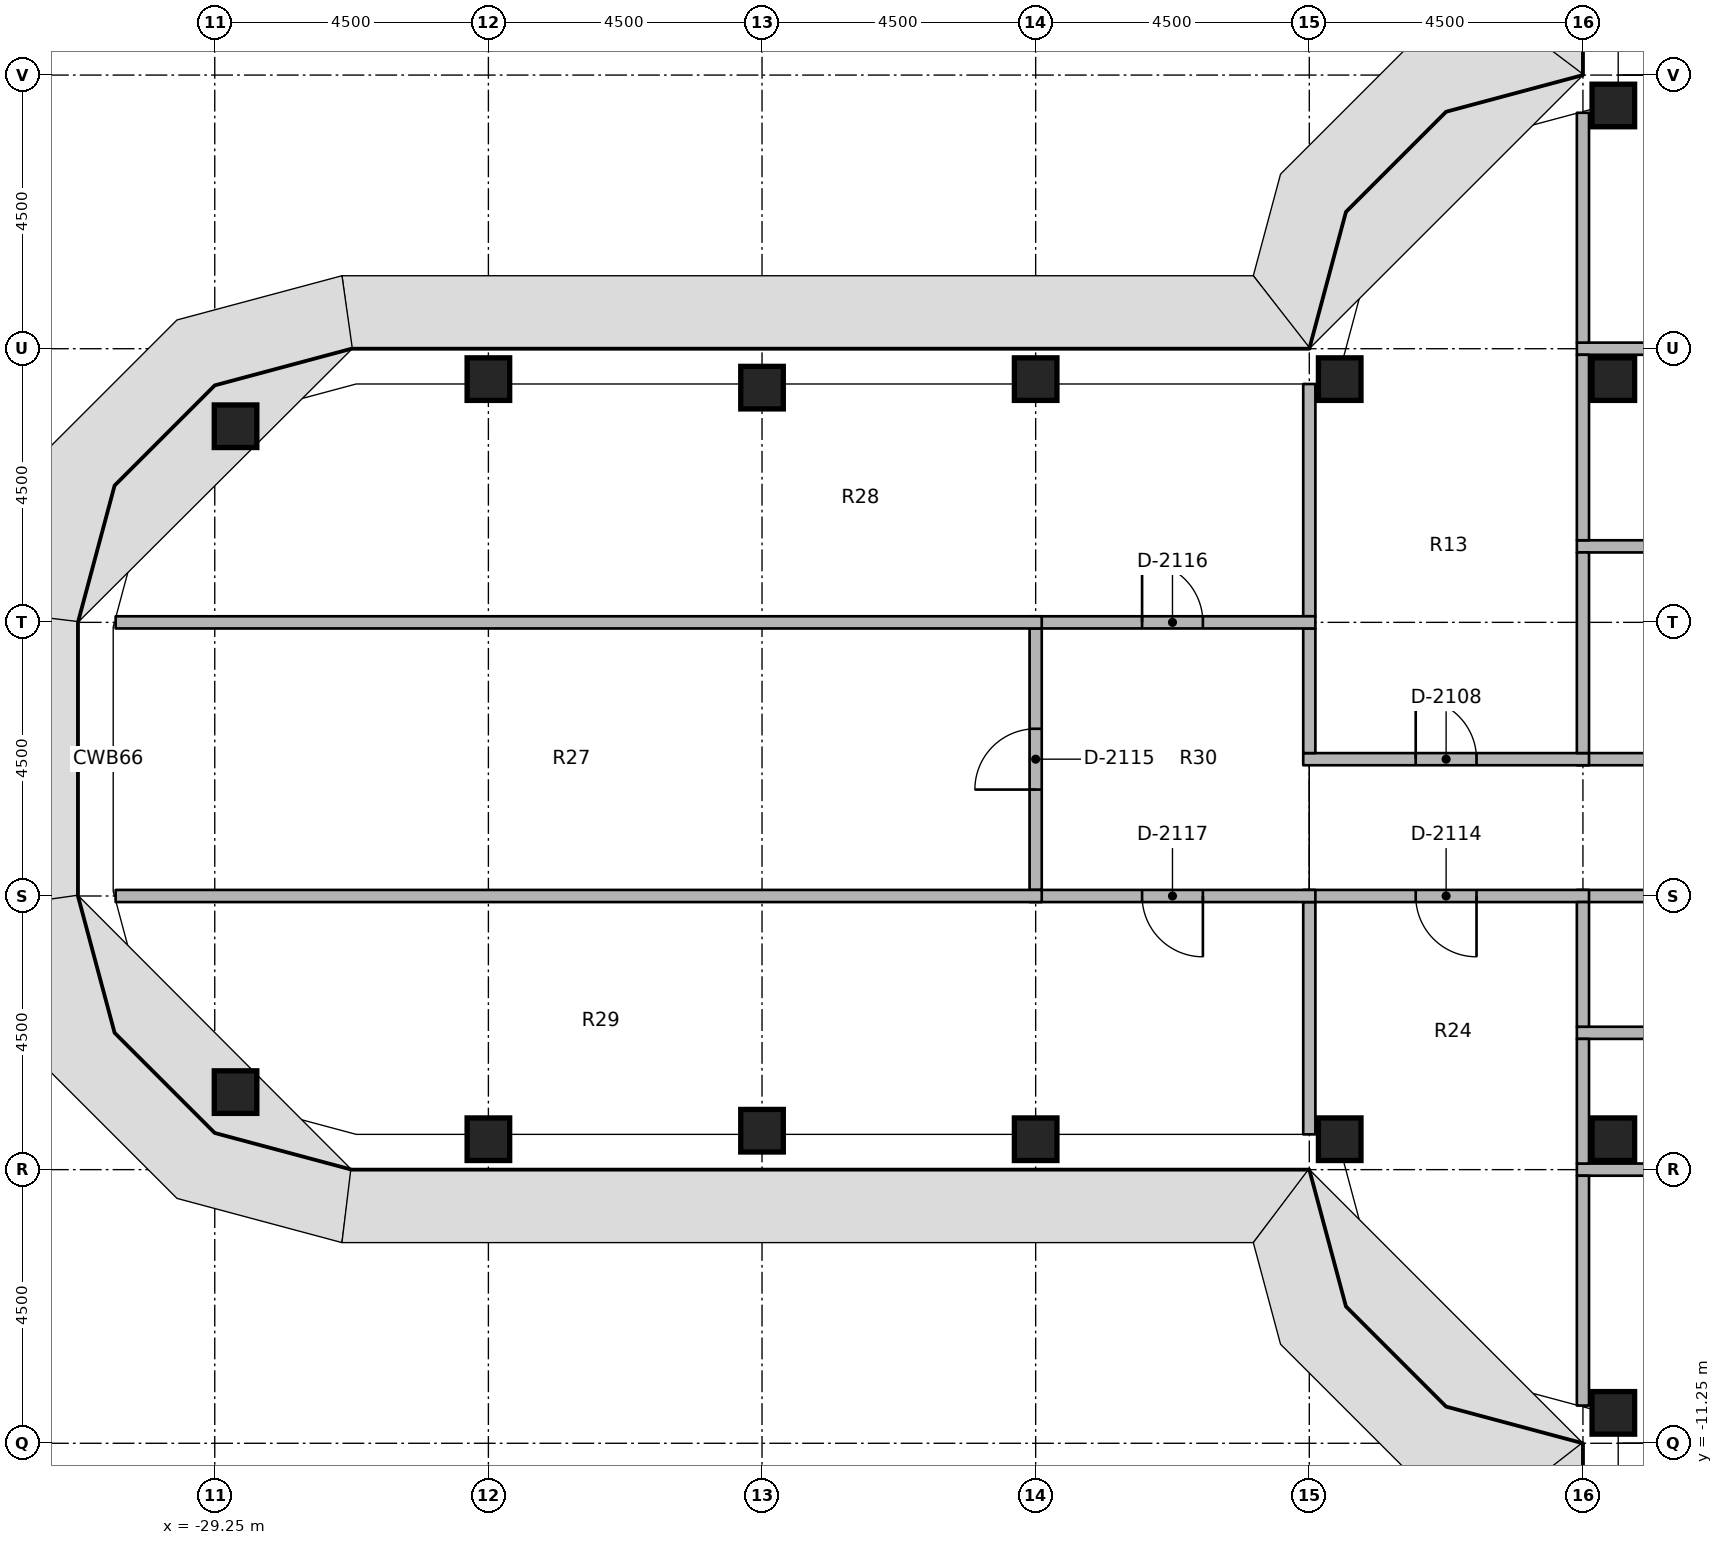
"""IFC4 building model, lengths in metres.
Left out: names, types, materials, properties, quantities, classifications, styles, units other than length and angle.
Written with IfcOpenShell. Run it as: python <this file> out.ifc"""

import sys

from ifc_helpers import new_model, si_unit, direction, frame, frame_2d, origin, origin_2d, place, context, subcontext, project, spatial, rectangle, extrude, element, fill, save


model = new_model("IFC4")
c1 = context("Model", 3, precision=1e-05, world=origin(), true_north=direction((0.0, 1.0)))
c2 = subcontext(c1, "Body", "Model", "MODEL_VIEW")
j1 = project(units=[si_unit("LENGTHUNIT", "METRE"), si_unit("PLANEANGLEUNIT", "RADIAN")], contexts=[c1])
p1 = place(None, origin())
s1 = spatial("IfcSite", under=j1, at=p1, CompositionType="ELEMENT")
p2 = place(p1, origin())
s2 = spatial("IfcBuilding", under=s1, at=p2, CompositionType="ELEMENT")
p3 = place(p2, frame((0.0, 0.0, 195.4)))
s3 = spatial("IfcBuildingStorey", under=s2, at=p3, CompositionType="ELEMENT", Elevation=195.4)
for number, where, z_axis, x_axis in (
    (1, (-28.908, -5.475, 0.0), (0.0, 0.0, 1.0), (1.0, 0.0, 0.0)),
    (2, (-28.908, 5.475, 0.0), (0.0, 0.0, 1.0), (1.0, 0.0, 0.0)),
    (3, (-24.75, -6.25, 0.0), (0.0, 0.0, 1.0), (1.0, 0.0, 0.0)),
    (4, (-24.75, 6.25, 0.0), (0.0, 0.0, 1.0), (1.0, 0.0, 0.0)),
    (5, (-20.25, -6.11, 0.0), (0.0, 0.0, 1.0), (1.0, 0.0, 0.0)),
    (6, (-20.25, 6.11, 0.0), (0.0, 0.0, 1.0), (1.0, 0.0, 0.0)),
    (7, (-15.75, -6.25, 0.0), (0.0, 0.0, 1.0), (1.0, 0.0, 0.0)),
    (8, (-15.75, 6.25, 0.0), (0.0, 0.0, 1.0), (1.0, 0.0, 0.0)),
    (9, (-10.75, -6.25, 0.0), (0.0, 0.0, 1.0), (1.0, 0.0, 0.0)),
    (10, (-10.75, 6.25, 0.0), (0.0, 0.0, 1.0), (1.0, 0.0, 0.0)),
    (11, (-6.25, -10.75, 0.0), (0.0, 0.0, 1.0), (1.0, 0.0, 0.0)),
    (12, (-6.25, -6.25, 0.0), (0.0, 0.0, 1.0), (1.0, 0.0, 0.0)),
    (13, (-6.25, 6.25, 0.0), (0.0, 0.0, 1.0), (1.0, 0.0, 0.0)),
    (14, (-6.25, 10.75, 0.0), (0.0, 0.0, 1.0), (1.0, 0.0, 0.0)),
):
    element("IfcColumn", number, at=place(p3, frame(where, z_axis=z_axis, x_axis=x_axis)), inside=s3, PredefinedType="COLUMN", context=c2, shape_type="SweptSolid", body=[
        extrude(rectangle(XDim=0.7, YDim=0.7, at=origin_2d()), origin(), (0.0, 0.0, 1.0), 3.65),
    ])
p4 = place(p3, frame((-6.85, 0.0, 0.0), z_axis=(0.0, 0.0, 1.0), x_axis=(1.0, 0.0, 0.0)))
e15 = element("IfcWall", 15, at=p4, inside=s3, PredefinedType="PARTITIONING", context=c2, shape_type="SweptSolid", body=[
    extrude(rectangle(XDim=5.825, YDim=0.2, at=frame_2d((2.913, 0.0))), origin(), (0.0, 0.0, 1.0), 2.75),
])
p5 = place(p4, frame((2.462, 0.0, 0.0)))
e16 = element("IfcOpeningElement", 16, at=p5, cuts=e15, PredefinedType="OPENING", context=c2, shape_type="SweptSolid", body=[
    extrude(rectangle(XDim=0.9, YDim=2.1, at=frame_2d((0.45, 1.05))), frame((0.0, 0.11, 0.0), z_axis=(0.0, -1.0, 0.0), x_axis=(1.0, 0.0, 0.0)), (0.0, 0.0, 1.0), 0.22),
])
p6 = place(p3, frame((-11.35, 0.0, 0.0), z_axis=(0.0, 0.0, 1.0), x_axis=(1.0, 0.0, 0.0)))
e17 = element("IfcWall", 17, at=p6, inside=s3, PredefinedType="PARTITIONING", context=c2, shape_type="SweptSolid", body=[
    extrude(rectangle(XDim=4.7, YDim=0.2, at=frame_2d((2.35, 0.0))), origin(), (0.0, 0.0, 1.0), 2.75),
])
p7 = place(p6, frame((1.85, 0.0, 0.0)))
e18 = element("IfcOpeningElement", 18, at=p7, cuts=e17, PredefinedType="OPENING", context=c2, shape_type="SweptSolid", body=[
    extrude(rectangle(XDim=1.0, YDim=2.1, at=frame_2d((0.5, 1.05))), frame((0.0, 0.11, 0.0), z_axis=(0.0, -1.0, 0.0), x_axis=(1.0, 0.0, 0.0)), (0.0, 0.0, 1.0), 0.22),
])
p8 = place(p3, frame((-1.025, -2.25, 0.0), z_axis=(0.0, 0.0, 1.0), x_axis=(-1.0, 0.0, 0.0)))
e19 = element("IfcWall", 19, at=p8, inside=s3, PredefinedType="PARTITIONING", context=c2, shape_type="SweptSolid", body=[
    extrude(rectangle(XDim=5.825, YDim=0.2, at=frame_2d((2.913, 0.0))), origin(), (0.0, 0.0, 1.0), 2.75),
])
p9 = place(p8, frame((2.462, 0.0, 0.0)))
e20 = element("IfcOpeningElement", 20, at=p9, cuts=e19, PredefinedType="OPENING", context=c2, shape_type="SweptSolid", body=[
    extrude(rectangle(XDim=0.9, YDim=2.1, at=frame_2d((0.45, 1.05))), frame((0.0, 0.11, 0.0), z_axis=(0.0, -1.0, 0.0), x_axis=(1.0, 0.0, 0.0)), (0.0, 0.0, 1.0), 0.22),
])
p10 = place(p3, frame((-6.65, -2.25, 0.0), z_axis=(0.0, 0.0, 1.0), x_axis=(-1.0, 0.0, 0.0)))
e21 = element("IfcWall", 21, at=p10, inside=s3, PredefinedType="PARTITIONING", context=c2, shape_type="SweptSolid", body=[
    extrude(rectangle(XDim=4.7, YDim=0.2, at=frame_2d((2.35, 0.0))), origin(), (0.0, 0.0, 1.0), 2.75),
])
p11 = place(p10, frame((1.85, 0.0, 0.0)))
e22 = element("IfcOpeningElement", 22, at=p11, cuts=e21, PredefinedType="OPENING", context=c2, shape_type="SweptSolid", body=[
    extrude(rectangle(XDim=1.0, YDim=2.1, at=frame_2d((0.5, 1.05))), frame((0.0, 0.11, 0.0), z_axis=(0.0, -1.0, 0.0), x_axis=(1.0, 0.0, 0.0)), (0.0, 0.0, 1.0), 0.22),
])
p12 = place(p3, frame((-6.85, 6.75, 0.0), z_axis=(0.0, 0.0, 1.0), x_axis=(1.0, 0.0, 0.0)))
e23 = element("IfcWall", 23, at=p12, inside=s3, PredefinedType="PARTITIONING", context=c2, shape_type="SweptSolid", body=[
    extrude(rectangle(XDim=5.825, YDim=0.2, at=frame_2d((2.913, 0.0))), origin(), (0.0, 0.0, 1.0), 2.75),
])
p13 = place(p3, frame((-6.75, 6.85, 0.0), z_axis=(0.0, 0.0, 1.0), x_axis=(0.0, 1.0, 0.0)))
e24 = element("IfcWall", 24, at=p13, inside=s3, PredefinedType="PARTITIONING", context=c2, shape_type="SweptSolid", body=[
    extrude(rectangle(XDim=3.78, YDim=0.2, at=frame_2d((1.89, 0.0))), origin(), (0.0, 0.0, 1.0), 2.75),
])
p14 = place(p3, frame((-6.85, -6.75, 0.0), z_axis=(0.0, 0.0, 1.0), x_axis=(1.0, 0.0, 0.0)))
e25 = element("IfcWall", 25, at=p14, inside=s3, PredefinedType="PARTITIONING", context=c2, shape_type="SweptSolid", body=[
    extrude(rectangle(XDim=5.825, YDim=0.2, at=frame_2d((2.913, 0.0))), origin(), (0.0, 0.0, 1.0), 2.75),
])
p15 = place(p3, frame((-6.75, -10.63, 0.0), z_axis=(0.0, 0.0, 1.0), x_axis=(0.0, 1.0, 0.0)))
e26 = element("IfcWall", 26, at=p15, inside=s3, PredefinedType="PARTITIONING", context=c2, shape_type="SweptSolid", body=[
    extrude(rectangle(XDim=3.78, YDim=0.2, at=frame_2d((1.89, 0.0))), origin(), (0.0, 0.0, 1.0), 2.75),
])
p16 = place(p3, frame((-6.85, 3.5, 0.0), z_axis=(0.0, 0.0, 1.0), x_axis=(1.0, 0.0, 0.0)))
e27 = element("IfcWall", 27, at=p16, inside=s3, PredefinedType="PARTITIONING", context=c2, shape_type="SweptSolid", body=[
    extrude(rectangle(XDim=5.825, YDim=0.2, at=frame_2d((2.913, 0.0))), origin(), (0.0, 0.0, 1.0), 2.75),
])
p17 = place(p3, frame((-6.75, 0.1, 0.0), z_axis=(0.0, 0.0, 1.0), x_axis=(0.0, 1.0, 0.0)))
e28 = element("IfcWall", 28, at=p17, inside=s3, PredefinedType="PARTITIONING", context=c2, shape_type="SweptSolid", body=[
    extrude(rectangle(XDim=3.3, YDim=0.2, at=frame_2d((1.65, 0.0))), origin(), (0.0, 0.0, 1.0), 2.75),
])
p18 = place(p3, frame((-6.75, 3.6, 0.0), z_axis=(0.0, 0.0, 1.0), x_axis=(0.0, 1.0, 0.0)))
e29 = element("IfcWall", 29, at=p18, inside=s3, PredefinedType="PARTITIONING", context=c2, shape_type="SweptSolid", body=[
    extrude(rectangle(XDim=3.05, YDim=0.2, at=frame_2d((1.525, 0.0))), origin(), (0.0, 0.0, 1.0), 2.75),
])
p19 = place(p3, frame((-11.25, 0.1, 0.0), z_axis=(0.0, 0.0, 1.0), x_axis=(0.0, 1.0, 0.0)))
e30 = element("IfcWall", 30, at=p19, inside=s3, PredefinedType="PARTITIONING", context=c2, shape_type="SweptSolid", body=[
    extrude(rectangle(XDim=2.05, YDim=0.2, at=frame_2d((1.025, 0.0))), origin(), (0.0, 0.0, 1.0), 2.75),
])
p20 = place(p3, frame((-11.25, 2.35, 0.0), z_axis=(0.0, 0.0, 1.0), x_axis=(0.0, 1.0, 0.0)))
e31 = element("IfcWall", 31, at=p20, inside=s3, PredefinedType="PARTITIONING", context=c2, shape_type="SweptSolid", body=[
    extrude(rectangle(XDim=3.82, YDim=0.2, at=frame_2d((1.91, 0.0))), origin(), (0.0, 0.0, 1.0), 2.75),
])
p21 = place(p3, frame((-6.85, -4.5, 0.0), z_axis=(0.0, 0.0, 1.0), x_axis=(1.0, 0.0, 0.0)))
e32 = element("IfcWall", 32, at=p21, inside=s3, PredefinedType="PARTITIONING", context=c2, shape_type="SweptSolid", body=[
    extrude(rectangle(XDim=5.825, YDim=0.2, at=frame_2d((2.913, 0.0))), origin(), (0.0, 0.0, 1.0), 2.75),
])
for number, where, z_axis, x_axis in (
    (33, (-6.75, -4.4, 0.0), (0.0, 0.0, 1.0), (0.0, 1.0, 0.0)),
    (34, (-6.75, -6.65, 0.0), (0.0, 0.0, 1.0), (0.0, 1.0, 0.0)),
):
    element("IfcWall", number, at=place(p3, frame(where, z_axis=z_axis, x_axis=x_axis)), inside=s3, PredefinedType="PARTITIONING", context=c2, shape_type="SweptSolid", body=[
        extrude(rectangle(XDim=2.05, YDim=0.2, at=frame_2d((1.025, 0.0))), origin(), (0.0, 0.0, 1.0), 2.75),
    ])
p22 = place(p3, frame((-11.25, -6.17, 0.0), z_axis=(0.0, 0.0, 1.0), x_axis=(0.0, 1.0, 0.0)))
e35 = element("IfcWall", 35, at=p22, inside=s3, PredefinedType="PARTITIONING", context=c2, shape_type="SweptSolid", body=[
    extrude(rectangle(XDim=3.82, YDim=0.2, at=frame_2d((1.91, 0.0))), origin(), (0.0, 0.0, 1.0), 2.75),
])
p23 = place(p3, frame((-15.85, 2.25, 0.0), z_axis=(0.0, 0.0, 1.0), x_axis=(1.0, 0.0, 0.0)))
e36 = element("IfcWall", 36, at=p23, inside=s3, PredefinedType="PARTITIONING", context=c2, shape_type="SweptSolid", body=[
    extrude(rectangle(XDim=4.7, YDim=0.2, at=frame_2d((2.35, 0.0))), origin(), (0.0, 0.0, 1.0), 2.75),
])
p24 = place(p23, frame((1.85, 0.0, 0.0)))
e37 = element("IfcOpeningElement", 37, at=p24, cuts=e36, PredefinedType="OPENING", context=c2, shape_type="SweptSolid", body=[
    extrude(rectangle(XDim=1.0, YDim=2.1, at=frame_2d((0.5, 1.05))), frame((0.0, 0.11, 0.0), z_axis=(0.0, -1.0, 0.0), x_axis=(1.0, 0.0, 0.0)), (0.0, 0.0, 1.0), 0.22),
])
p25 = place(p3, frame((-11.15, -2.25, 0.0), z_axis=(0.0, 0.0, 1.0), x_axis=(-1.0, 0.0, 0.0)))
e38 = element("IfcWall", 38, at=p25, inside=s3, PredefinedType="PARTITIONING", context=c2, shape_type="SweptSolid", body=[
    extrude(rectangle(XDim=4.7, YDim=0.2, at=frame_2d((2.35, 0.0))), origin(), (0.0, 0.0, 1.0), 2.75),
])
p26 = place(p25, frame((1.85, 0.0, 0.0)))
e39 = element("IfcOpeningElement", 39, at=p26, cuts=e38, PredefinedType="OPENING", context=c2, shape_type="SweptSolid", body=[
    extrude(rectangle(XDim=1.0, YDim=2.1, at=frame_2d((0.5, 1.05))), frame((0.0, 0.11, 0.0), z_axis=(0.0, -1.0, 0.0), x_axis=(1.0, 0.0, 0.0)), (0.0, 0.0, 1.0), 0.22),
])
p27 = place(p3, frame((-15.75, -2.15, 0.0), z_axis=(0.0, 0.0, 1.0), x_axis=(0.0, 1.0, 0.0)))
e40 = element("IfcWall", 40, at=p27, inside=s3, PredefinedType="PARTITIONING", context=c2, shape_type="SweptSolid", body=[
    extrude(rectangle(XDim=4.3, YDim=0.2, at=frame_2d((2.15, 0.0))), origin(), (0.0, 0.0, 1.0), 2.75),
])
p28 = place(p27, frame((1.65, 0.0, 0.0)))
e41 = element("IfcOpeningElement", 41, at=p28, cuts=e40, PredefinedType="OPENING", context=c2, shape_type="SweptSolid", body=[
    extrude(rectangle(XDim=1.0, YDim=2.1, at=frame_2d((0.5, 1.05))), frame((0.0, 0.11, 0.0), z_axis=(0.0, -1.0, 0.0), x_axis=(1.0, 0.0, 0.0)), (0.0, 0.0, 1.0), 0.22),
])
for number, where, z_axis, x_axis in (
    (42, (-30.88, 2.25, 0.0), (0.0, 0.0, 1.0), (1.0, 0.0, 0.0)),
    (43, (-30.88, -2.25, 0.0), (0.0, 0.0, 1.0), (1.0, 0.0, 0.0)),
):
    element("IfcWall", number, at=place(p3, frame(where, z_axis=z_axis, x_axis=x_axis)), inside=s3, PredefinedType="PARTITIONING", context=c2, shape_type="SweptSolid", body=[
        extrude(rectangle(XDim=15.23, YDim=0.2, at=frame_2d((7.615, 0.0))), origin(), (0.0, 0.0, 1.0), 2.75),
    ])
p29 = place(p7, origin())
e44 = element("IfcDoor", 44, at=p29, inside=s3, OperationType="SINGLE_SWING_RIGHT", PredefinedType="DOOR", context=c2, shape_type="SweptSolid", body=[
    extrude(rectangle(XDim=1.0, YDim=2.1, at=frame_2d((0.5, 1.05))), frame((0.0, 0.025, 0.0), z_axis=(0.0, -1.0, 0.0), x_axis=(1.0, 0.0, 0.0)), (0.0, 0.0, 1.0), 0.05),
])
fill(e18, e44)
p30 = place(p11, origin())
e45 = element("IfcDoor", 45, at=p30, inside=s3, OperationType="SINGLE_SWING_RIGHT", PredefinedType="DOOR", context=c2, shape_type="SweptSolid", body=[
    extrude(rectangle(XDim=1.0, YDim=2.1, at=frame_2d((0.5, 1.05))), frame((0.0, 0.025, 0.0), z_axis=(0.0, -1.0, 0.0), x_axis=(1.0, 0.0, 0.0)), (0.0, 0.0, 1.0), 0.05),
])
fill(e22, e45)
p31 = place(p28, origin())
e46 = element("IfcDoor", 46, at=p31, inside=s3, OperationType="SINGLE_SWING_RIGHT", PredefinedType="DOOR", context=c2, shape_type="SweptSolid", body=[
    extrude(rectangle(XDim=1.0, YDim=2.1, at=frame_2d((0.5, 1.05))), frame((0.0, 0.025, 0.0), z_axis=(0.0, -1.0, 0.0), x_axis=(1.0, 0.0, 0.0)), (0.0, 0.0, 1.0), 0.05),
])
fill(e41, e46)
p32 = place(p24, origin())
e47 = element("IfcDoor", 47, at=p32, inside=s3, OperationType="SINGLE_SWING_RIGHT", PredefinedType="DOOR", context=c2, shape_type="SweptSolid", body=[
    extrude(rectangle(XDim=1.0, YDim=2.1, at=frame_2d((0.5, 1.05))), frame((0.0, 0.025, 0.0), z_axis=(0.0, -1.0, 0.0), x_axis=(1.0, 0.0, 0.0)), (0.0, 0.0, 1.0), 0.05),
])
fill(e37, e47)
p33 = place(p26, origin())
e48 = element("IfcDoor", 48, at=p33, inside=s3, OperationType="SINGLE_SWING_RIGHT", PredefinedType="DOOR", context=c2, shape_type="SweptSolid", body=[
    extrude(rectangle(XDim=1.0, YDim=2.1, at=frame_2d((0.5, 1.05))), frame((0.0, 0.025, 0.0), z_axis=(0.0, -1.0, 0.0), x_axis=(1.0, 0.0, 0.0)), (0.0, 0.0, 1.0), 0.05),
])
fill(e39, e48)
save(model, sys.argv[1])
